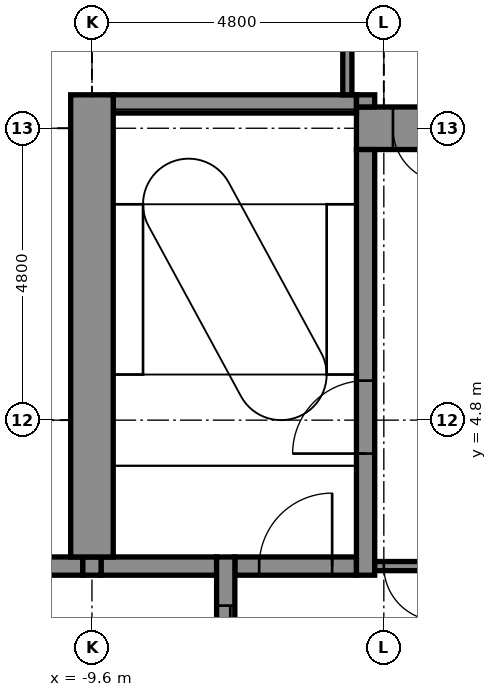
"""IFC4 building model, lengths in metres.
Left out: names, types, materials, properties, quantities, classifications, styles, units other than length and angle.
Written with IfcOpenShell. Run it as: python <this file> out.ifc"""

import sys

from ifc_helpers import new_model, si_unit, direction, frame, frame_2d, origin, place, context, subcontext, project, spatial, rectangle, extrude, element, fill, save


model = new_model("IFC4")
c1 = context("Model", 3, precision=1e-05, world=origin(), true_north=direction((0.0, 1.0)))
c2 = subcontext(c1, "Body", "Model", "MODEL_VIEW")
j1 = project(units=[si_unit("LENGTHUNIT", "METRE"), si_unit("PLANEANGLEUNIT", "RADIAN")], contexts=[c1])
p1 = place(None, origin())
s1 = spatial("IfcSite", under=j1, at=p1, CompositionType="ELEMENT")
p2 = place(p1, origin())
s2 = spatial("IfcBuilding", under=s1, at=p2, CompositionType="ELEMENT")
p3 = place(p2, frame((0.0, 0.0, 212.9)))
s3 = spatial("IfcBuildingStorey", under=s2, at=p3, CompositionType="ELEMENT", Elevation=212.9)
p4 = place(p3, frame((-10.85, 2.4, -0.15), z_axis=(0.0, 0.0, 1.0), x_axis=(1.0, 0.0, 0.0)))
e1 = element("IfcWall", 1, at=p4, inside=s3, PredefinedType="STANDARD", context=c2, shape_type="SweptSolid", body=[
    extrude(rectangle(XDim=1.1, YDim=0.3, at=frame_2d((0.55, 0.0))), origin(), (0.0, 0.0, 1.0), 3.75),
])
p5 = place(p3, frame((-9.45, 2.4, -0.15), z_axis=(0.0, 0.0, 1.0), x_axis=(1.0, 0.0, 0.0)))
e2 = element("IfcWall", 2, at=p5, inside=s3, PredefinedType="STANDARD", context=c2, shape_type="SweptSolid", body=[
    extrude(rectangle(XDim=1.9, YDim=0.3, at=frame_2d((0.95, 0.0))), origin(), (0.0, 0.0, 1.0), 3.75),
])
p6 = place(p3, frame((-7.25, 2.4, -0.15), z_axis=(0.0, 0.0, 1.0), x_axis=(1.0, 0.0, 0.0)))
e3 = element("IfcWall", 3, at=p6, inside=s3, PredefinedType="STANDARD", context=c2, shape_type="SweptSolid", body=[
    extrude(rectangle(XDim=2.0, YDim=0.3, at=frame_2d((1.0, 0.0))), origin(), (0.0, 0.0, 1.0), 3.75),
])
p7 = place(p6, frame((0.4, 0.0, 0.15)))
e4 = element("IfcOpeningElement", 4, at=p7, cuts=e3, PredefinedType="OPENING", context=c2, shape_type="SweptSolid", body=[
    extrude(rectangle(XDim=1.2, YDim=2.1, at=frame_2d((0.6, 1.05))), frame((0.0, 0.16, 0.0), z_axis=(0.0, -1.0, 0.0), x_axis=(1.0, 0.0, 0.0)), (0.0, 0.0, 1.0), 0.32),
])
p8 = place(p3, frame((-5.25, 9.6, -0.15), z_axis=(0.0, 0.0, 1.0), x_axis=(1.0, 0.0, 0.0)))
e5 = element("IfcWall", 5, at=p8, inside=s3, PredefinedType="SHEAR", context=c2, shape_type="SweptSolid", body=[
    extrude(rectangle(XDim=14.5, YDim=0.7, at=frame_2d((7.25, 0.0))), origin(), (0.0, 0.0, 1.0), 3.75),
])
p9 = place(p8, frame((0.6, 0.0, 0.15)))
e6 = element("IfcOpeningElement", 6, at=p9, cuts=e5, PredefinedType="OPENING", context=c2, shape_type="SweptSolid", body=[
    extrude(rectangle(XDim=0.9, YDim=2.1, at=frame_2d((0.45, 1.05))), frame((0.0, 0.36, 0.0), z_axis=(0.0, -1.0, 0.0), x_axis=(1.0, 0.0, 0.0)), (0.0, 0.0, 1.0), 0.72),
])
p10 = place(p3, frame((-9.25, 10.0, -0.15), z_axis=(0.0, 0.0, 1.0), x_axis=(1.0, 0.0, 0.0)))
e7 = element("IfcWall", 7, at=p10, inside=s3, PredefinedType="STANDARD", context=c2, shape_type="SweptSolid", body=[
    extrude(rectangle(XDim=4.0, YDim=0.3, at=frame_2d((2.0, 0.0))), origin(), (0.0, 0.0, 1.0), 3.75),
])
p11 = place(p3, frame((-9.6, 2.25, -0.15), z_axis=(0.0, 0.0, 1.0), x_axis=(0.0, 1.0, 0.0)))
e8 = element("IfcWall", 8, at=p11, inside=s3, PredefinedType="STANDARD", context=c2, shape_type="SweptSolid", body=[
    extrude(rectangle(XDim=0.3, YDim=0.3, at=frame_2d((0.15, 0.0))), origin(), (0.0, 0.0, 1.0), 3.75),
])
p12 = place(p3, frame((-9.6, 2.55, -0.15), z_axis=(0.0, 0.0, 1.0), x_axis=(0.0, 1.0, 0.0)))
e9 = element("IfcWall", 9, at=p12, inside=s3, PredefinedType="SHEAR", context=c2, shape_type="SweptSolid", body=[
    extrude(rectangle(XDim=7.6, YDim=0.7, at=frame_2d((3.8, 0.0))), origin(), (0.0, 0.0, 1.0), 3.75),
])
p13 = place(p3, frame((-7.4, -2.55, -0.15), z_axis=(0.0, 0.0, 1.0), x_axis=(0.0, 1.0, 0.0)))
e10 = element("IfcWall", 10, at=p13, inside=s3, PredefinedType="STANDARD", context=c2, shape_type="SweptSolid", body=[
    extrude(rectangle(XDim=5.1, YDim=0.3, at=frame_2d((2.55, 0.0))), origin(), (0.0, 0.0, 1.0), 3.75),
])
p14 = place(p13, frame((0.8, 0.0, 0.15)))
e11 = element("IfcOpeningElement", 11, at=p14, cuts=e10, PredefinedType="OPENING", context=c2, shape_type="SweptSolid", body=[
    extrude(rectangle(XDim=1.1, YDim=2.1, at=frame_2d((0.55, 1.05))), frame((0.0, 0.16, 0.0), z_axis=(0.0, -1.0, 0.0), x_axis=(1.0, 0.0, 0.0)), (0.0, 0.0, 1.0), 0.32),
])
p15 = place(p13, frame((3.2, 0.0, 0.15)))
e12 = element("IfcOpeningElement", 12, at=p15, cuts=e10, PredefinedType="OPENING", context=c2, shape_type="SweptSolid", body=[
    extrude(rectangle(XDim=1.1, YDim=2.1, at=frame_2d((0.55, 1.05))), frame((0.0, 0.16, 0.0), z_axis=(0.0, -1.0, 0.0), x_axis=(1.0, 0.0, 0.0)), (0.0, 0.0, 1.0), 0.32),
])
p16 = place(p3, frame((-5.1, 2.25, -0.15), z_axis=(0.0, 0.0, 1.0), x_axis=(0.0, 1.0, 0.0)))
e13 = element("IfcWall", 13, at=p16, inside=s3, PredefinedType="STANDARD", context=c2, shape_type="SweptSolid", body=[
    extrude(rectangle(XDim=7.0, YDim=0.3, at=frame_2d((3.5, 0.0))), origin(), (0.0, 0.0, 1.0), 3.75),
])
p17 = place(p16, frame((2.0, 0.0, 0.15)))
e14 = element("IfcOpeningElement", 14, at=p17, cuts=e13, PredefinedType="OPENING", context=c2, shape_type="SweptSolid", body=[
    extrude(rectangle(XDim=1.2, YDim=2.1, at=frame_2d((0.6, 1.05))), frame((0.0, 0.16, 0.0), z_axis=(0.0, -1.0, 0.0), x_axis=(1.0, 0.0, 0.0)), (0.0, 0.0, 1.0), 0.32),
])
p18 = place(p3, frame((-5.1, 9.95, -0.15), z_axis=(0.0, 0.0, 1.0), x_axis=(0.0, 1.0, 0.0)))
e15 = element("IfcWall", 15, at=p18, inside=s3, PredefinedType="STANDARD", context=c2, shape_type="SweptSolid", body=[
    extrude(rectangle(XDim=0.2, YDim=0.3, at=frame_2d((0.1, 0.0))), origin(), (0.0, 0.0, 1.0), 3.75),
])
p19 = place(p3, frame((-5.4, 10.15, 0.0), z_axis=(0.0, 0.0, 1.0), x_axis=(0.0, 1.0, 0.0)))
e16 = element("IfcWall", 16, at=p19, inside=s3, PredefinedType="PARTITIONING", context=c2, shape_type="SweptSolid", body=[
    extrude(rectangle(XDim=4.65, YDim=0.15, at=frame_2d((2.325, 0.0))), origin(), (0.0, 0.0, 1.0), 3.6),
])
p20 = place(p3, frame((-4.95, 2.4, 0.0), z_axis=(0.0, 0.0, 1.0), x_axis=(1.0, 0.0, 0.0)))
e17 = element("IfcWall", 17, at=p20, inside=s3, PredefinedType="PARTITIONING", context=c2, shape_type="SweptSolid", body=[
    extrude(rectangle(XDim=1.2, YDim=0.15, at=frame_2d((0.6, 0.0))), origin(), (0.0, 0.0, 1.0), 3.6),
])
p21 = place(p20, frame((0.15, 0.0, 0.0)))
e18 = element("IfcOpeningElement", 18, at=p21, cuts=e17, PredefinedType="OPENING", context=c2, shape_type="SweptSolid", body=[
    extrude(rectangle(XDim=0.9, YDim=2.1, at=frame_2d((0.45, 1.05))), frame((0.0, 0.085, 0.0), z_axis=(0.0, -1.0, 0.0), x_axis=(1.0, 0.0, 0.0)), (0.0, 0.0, 1.0), 0.17),
])
p22 = place(p15, origin())
e19 = element("IfcDoor", 19, at=p22, inside=s3, OperationType="DOUBLE_DOOR_SLIDING", PredefinedType="DOOR", context=c2, shape_type="SweptSolid", body=[
    extrude(rectangle(XDim=1.1, YDim=2.1, at=frame_2d((0.55, 1.05))), frame((0.0, 0.025, 0.0), z_axis=(0.0, -1.0, 0.0), x_axis=(1.0, 0.0, 0.0)), (0.0, 0.0, 1.0), 0.05),
])
fill(e12, e19)
p23 = place(p17, origin())
e20 = element("IfcDoor", 20, at=p23, inside=s3, OperationType="SINGLE_SWING_LEFT", PredefinedType="DOOR", context=c2, shape_type="SweptSolid", body=[
    extrude(rectangle(XDim=1.2, YDim=2.1, at=frame_2d((0.6, 1.05))), frame((0.0, 0.025, 0.0), z_axis=(0.0, -1.0, 0.0), x_axis=(1.0, 0.0, 0.0)), (0.0, 0.0, 1.0), 0.05),
])
fill(e14, e20)
p24 = place(p9, frame((0.9, 0.0, 0.0), z_axis=(0.0, 0.0, 1.0), x_axis=(-1.0, 0.0, 0.0)))
e21 = element("IfcDoor", 21, at=p24, inside=s3, OperationType="SINGLE_SWING_RIGHT", PredefinedType="DOOR", context=c2, shape_type="SweptSolid", body=[
    extrude(rectangle(XDim=0.9, YDim=2.1, at=frame_2d((0.45, 1.05))), frame((0.0, 0.025, 0.0), z_axis=(0.0, -1.0, 0.0), x_axis=(1.0, 0.0, 0.0)), (0.0, 0.0, 1.0), 0.05),
])
fill(e6, e21)
p25 = place(p21, frame((0.9, 0.0, 0.0), z_axis=(0.0, 0.0, 1.0), x_axis=(-1.0, 0.0, 0.0)))
e22 = element("IfcDoor", 22, at=p25, inside=s3, OperationType="SINGLE_SWING_RIGHT", PredefinedType="DOOR", context=c2, shape_type="SweptSolid", body=[
    extrude(rectangle(XDim=0.9, YDim=2.1, at=frame_2d((0.45, 1.05))), frame((0.0, 0.025, 0.0), z_axis=(0.0, -1.0, 0.0), x_axis=(1.0, 0.0, 0.0)), (0.0, 0.0, 1.0), 0.05),
])
fill(e18, e22)
p26 = place(p7, origin())
e23 = element("IfcDoor", 23, at=p26, inside=s3, OperationType="SINGLE_SWING_RIGHT", PredefinedType="DOOR", context=c2, shape_type="SweptSolid", body=[
    extrude(rectangle(XDim=1.2, YDim=2.1, at=frame_2d((0.6, 1.05))), frame((0.0, 0.025, 0.0), z_axis=(0.0, -1.0, 0.0), x_axis=(1.0, 0.0, 0.0)), (0.0, 0.0, 1.0), 0.05),
])
fill(e4, e23)
save(model, sys.argv[1])
